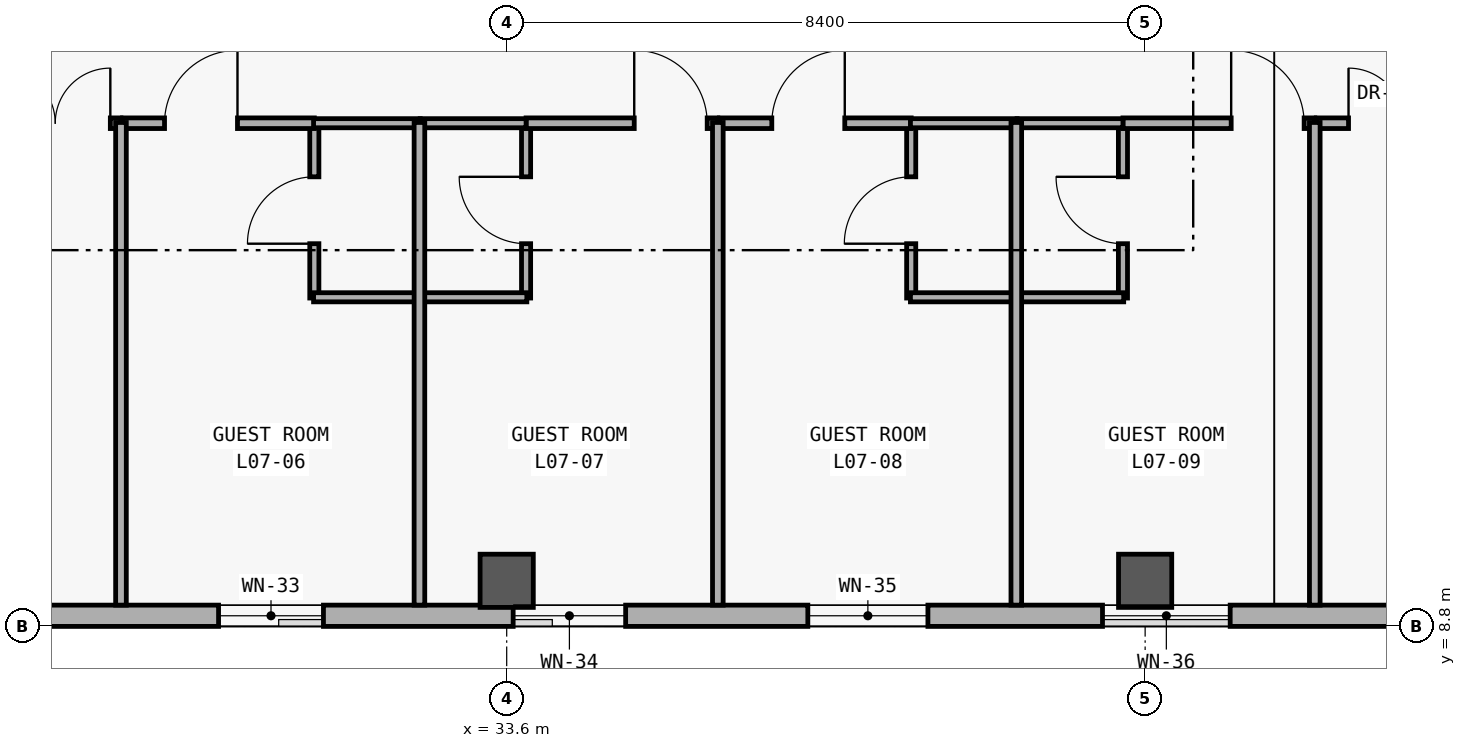
"""IFC4 building model, lengths in metres.
Left out: names, types, materials, properties, quantities, classifications, styles, units other than length and angle.
Written with IfcOpenShell. Run it as: python <this file> out.ifc"""

import sys

from ifc_helpers import new_model, si_unit, direction, frame, frame_2d, origin, origin_2d, place, context, subcontext, project, spatial, rectangle, extrude, element, fill, save


model = new_model("IFC4")
c1 = context("Model", 3, precision=1e-05, world=origin(), true_north=direction((0.0, 1.0)))
c2 = subcontext(c1, "Body", "Model", "MODEL_VIEW")
j1 = project(units=[si_unit("LENGTHUNIT", "METRE"), si_unit("PLANEANGLEUNIT", "RADIAN")], contexts=[c1])
p1 = place(None, origin())
s1 = spatial("IfcSite", under=j1, at=p1, CompositionType="ELEMENT")
p2 = place(p1, origin())
s2 = spatial("IfcBuilding", under=s1, at=p2, CompositionType="ELEMENT")
p3 = place(p2, frame((0.0, 0.0, 30.0)))
s3 = spatial("IfcBuildingStorey", under=s2, at=p3, CompositionType="ELEMENT", Elevation=30.0)
for number, where, z_axis, x_axis in (
    (1, (33.6, 9.4, 0.0), (0.0, 0.0, 1.0), (1.0, 0.0, 0.0)),
    (2, (42.0, 9.4, 0.0), (0.0, 0.0, 1.0), (1.0, 0.0, 0.0)),
):
    element("IfcColumn", number, at=place(p3, frame(where, z_axis=z_axis, x_axis=x_axis)), inside=s3, PredefinedType="COLUMN", context=c2, shape_type="SweptSolid", body=[
        extrude(rectangle(XDim=0.7, YDim=0.7, at=origin_2d()), origin(), (0.0, 0.0, 1.0), 3.6),
    ])
p4 = place(p3, frame((75.32, 8.94, 0.0), z_axis=(0.0, 0.0, 1.0), x_axis=(-1.0, 0.0, 0.0)))
e3 = element("IfcWall", 3, at=p4, inside=s3, PredefinedType="SOLIDWALL", context=c2, shape_type="SweptSolid", body=[
    extrude(rectangle(XDim=66.64, YDim=0.28, at=frame_2d((33.32, 0.0))), origin(), (0.0, 0.0, 1.0), 3.34),
])
p5 = place(p4, frame((6.47, 0.0, 0.85)))
e4 = element("IfcOpeningElement", 4, at=p5, cuts=e3, PredefinedType="OPENING", context=c2, shape_type="SweptSolid", body=[
    extrude(rectangle(XDim=2.4, YDim=1.8, at=frame_2d((1.2, 0.9))), frame((0.0, 0.15, 0.0), z_axis=(0.0, -1.0, 0.0), x_axis=(1.0, 0.0, 0.0)), (0.0, 0.0, 1.0), 0.3),
])
p6 = place(p4, frame((63.606, 0.0, 0.85)))
e5 = element("IfcOpeningElement", 5, at=p6, cuts=e3, PredefinedType="OPENING", context=c2, shape_type="SweptSolid", body=[
    extrude(rectangle(XDim=1.7, YDim=2.0, at=frame_2d((0.85, 1.0))), frame((0.0, 0.15, 0.0), z_axis=(0.0, -1.0, 0.0), x_axis=(1.0, 0.0, 0.0)), (0.0, 0.0, 1.0), 0.3),
])
p7 = place(p4, frame((59.379, 0.0, 0.85)))
e6 = element("IfcOpeningElement", 6, at=p7, cuts=e3, PredefinedType="OPENING", context=c2, shape_type="SweptSolid", body=[
    extrude(rectangle(XDim=2.3, YDim=2.05, at=frame_2d((1.15, 1.025))), frame((0.0, 0.15, 0.0), z_axis=(0.0, -1.0, 0.0), x_axis=(1.0, 0.0, 0.0)), (0.0, 0.0, 1.0), 0.3),
])
p8 = place(p4, frame((55.227, 0.0, 0.85)))
e7 = element("IfcOpeningElement", 7, at=p8, cuts=e3, PredefinedType="OPENING", context=c2, shape_type="SweptSolid", body=[
    extrude(rectangle(XDim=2.75, YDim=2.1, at=frame_2d((1.375, 1.05))), frame((0.0, 0.15, 0.0), z_axis=(0.0, -1.0, 0.0), x_axis=(1.0, 0.0, 0.0)), (0.0, 0.0, 1.0), 0.3),
])
p9 = place(p4, frame((52.085, 0.0, 0.85)))
e8 = element("IfcOpeningElement", 8, at=p9, cuts=e3, PredefinedType="OPENING", context=c2, shape_type="SweptSolid", body=[
    extrude(rectangle(XDim=1.18, YDim=1.5, at=frame_2d((0.59, 0.75))), frame((0.0, 0.15, 0.0), z_axis=(0.0, -1.0, 0.0), x_axis=(1.0, 0.0, 0.0)), (0.0, 0.0, 1.0), 0.3),
])
p10 = place(p4, frame((48.108, 0.0, 0.85)))
e9 = element("IfcOpeningElement", 9, at=p10, cuts=e3, PredefinedType="OPENING", context=c2, shape_type="SweptSolid", body=[
    extrude(rectangle(XDim=1.28, YDim=1.6, at=frame_2d((0.64, 0.8))), frame((0.0, 0.15, 0.0), z_axis=(0.0, -1.0, 0.0), x_axis=(1.0, 0.0, 0.0)), (0.0, 0.0, 1.0), 0.3),
])
p11 = place(p4, frame((44.131, 0.0, 0.85)))
e10 = element("IfcOpeningElement", 10, at=p11, cuts=e3, PredefinedType="OPENING", context=c2, shape_type="SweptSolid", body=[
    extrude(rectangle(XDim=1.38, YDim=1.7, at=frame_2d((0.69, 0.85))), frame((0.0, 0.15, 0.0), z_axis=(0.0, -1.0, 0.0), x_axis=(1.0, 0.0, 0.0)), (0.0, 0.0, 1.0), 0.3),
])
p12 = place(p4, frame((40.155, 0.0, 0.85)))
e11 = element("IfcOpeningElement", 11, at=p12, cuts=e3, PredefinedType="OPENING", context=c2, shape_type="SweptSolid", body=[
    extrude(rectangle(XDim=1.48, YDim=1.8, at=frame_2d((0.74, 0.9))), frame((0.0, 0.15, 0.0), z_axis=(0.0, -1.0, 0.0), x_axis=(1.0, 0.0, 0.0)), (0.0, 0.0, 1.0), 0.3),
])
p13 = place(p4, frame((36.178, 0.0, 0.85)))
e12 = element("IfcOpeningElement", 12, at=p13, cuts=e3, PredefinedType="OPENING", context=c2, shape_type="SweptSolid", body=[
    extrude(rectangle(XDim=1.58, YDim=1.85, at=frame_2d((0.79, 0.925))), frame((0.0, 0.15, 0.0), z_axis=(0.0, -1.0, 0.0), x_axis=(1.0, 0.0, 0.0)), (0.0, 0.0, 1.0), 0.3),
])
p14 = place(p4, frame((32.201, 0.0, 0.85)))
e13 = element("IfcOpeningElement", 13, at=p14, cuts=e3, PredefinedType="OPENING", context=c2, shape_type="SweptSolid", body=[
    extrude(rectangle(XDim=1.68, YDim=1.9, at=frame_2d((0.84, 0.95))), frame((0.0, 0.15, 0.0), z_axis=(0.0, -1.0, 0.0), x_axis=(1.0, 0.0, 0.0)), (0.0, 0.0, 1.0), 0.3),
])
p15 = place(p4, frame((28.224, 0.0, 0.85)))
e14 = element("IfcOpeningElement", 14, at=p15, cuts=e3, PredefinedType="OPENING", context=c2, shape_type="SweptSolid", body=[
    extrude(rectangle(XDim=1.78, YDim=1.95, at=frame_2d((0.89, 0.975))), frame((0.0, 0.15, 0.0), z_axis=(0.0, -1.0, 0.0), x_axis=(1.0, 0.0, 0.0)), (0.0, 0.0, 1.0), 0.3),
])
p16 = place(p4, frame((24.247, 0.0, 0.85)))
e15 = element("IfcOpeningElement", 15, at=p16, cuts=e3, PredefinedType="OPENING", context=c2, shape_type="SweptSolid", body=[
    extrude(rectangle(XDim=1.88, YDim=1.95, at=frame_2d((0.94, 0.975))), frame((0.0, 0.15, 0.0), z_axis=(0.0, -1.0, 0.0), x_axis=(1.0, 0.0, 0.0)), (0.0, 0.0, 1.0), 0.3),
])
p17 = place(p4, frame((20.235, 0.0, 0.85)))
e16 = element("IfcOpeningElement", 16, at=p17, cuts=e3, PredefinedType="OPENING", context=c2, shape_type="SweptSolid", body=[
    extrude(rectangle(XDim=2.05, YDim=1.95, at=frame_2d((1.025, 0.975))), frame((0.0, 0.15, 0.0), z_axis=(0.0, -1.0, 0.0), x_axis=(1.0, 0.0, 0.0)), (0.0, 0.0, 1.0), 0.3),
])
p18 = place(p4, frame((16.243, 0.0, 0.85)))
e17 = element("IfcOpeningElement", 17, at=p18, cuts=e3, PredefinedType="OPENING", context=c2, shape_type="SweptSolid", body=[
    extrude(rectangle(XDim=2.18, YDim=1.95, at=frame_2d((1.09, 0.975))), frame((0.0, 0.15, 0.0), z_axis=(0.0, -1.0, 0.0), x_axis=(1.0, 0.0, 0.0)), (0.0, 0.0, 1.0), 0.3),
])
p19 = place(p3, frame((31.069, 13.12, 0.0), z_axis=(0.0, 0.0, 1.0), x_axis=(0.0, 1.0, 0.0)))
e18 = element("IfcWall", 18, at=p19, inside=s3, PredefinedType="PARTITIONING", context=c2, shape_type="SweptSolid", body=[
    extrude(rectangle(XDim=2.31, YDim=0.12, at=frame_2d((1.155, 0.0))), origin(), (0.0, 0.0, 1.0), 2.48),
])
p20 = place(p19, frame((0.715, 0.0, 0.0)))
e19 = element("IfcOpeningElement", 19, at=p20, cuts=e18, PredefinedType="OPENING", context=c2, shape_type="SweptSolid", body=[
    extrude(rectangle(XDim=0.88, YDim=2.15, at=frame_2d((0.44, 1.075))), frame((0.0, 0.07, 0.0), z_axis=(0.0, -1.0, 0.0), x_axis=(1.0, 0.0, 0.0)), (0.0, 0.0, 1.0), 0.14),
])
p21 = place(p3, frame((33.855, 13.12, 0.0), z_axis=(0.0, 0.0, 1.0), x_axis=(0.0, 1.0, 0.0)))
e20 = element("IfcWall", 20, at=p21, inside=s3, PredefinedType="PARTITIONING", context=c2, shape_type="SweptSolid", body=[
    extrude(rectangle(XDim=2.31, YDim=0.12, at=frame_2d((1.155, 0.0))), origin(), (0.0, 0.0, 1.0), 2.48),
])
p22 = place(p21, frame((0.715, 0.0, 0.0)))
e21 = element("IfcOpeningElement", 21, at=p22, cuts=e20, PredefinedType="OPENING", context=c2, shape_type="SweptSolid", body=[
    extrude(rectangle(XDim=0.88, YDim=2.15, at=frame_2d((0.44, 1.075))), frame((0.0, 0.07, 0.0), z_axis=(0.0, -1.0, 0.0), x_axis=(1.0, 0.0, 0.0)), (0.0, 0.0, 1.0), 0.14),
])
p23 = place(p3, frame((38.922, 13.12, 0.0), z_axis=(0.0, 0.0, 1.0), x_axis=(0.0, 1.0, 0.0)))
e22 = element("IfcWall", 22, at=p23, inside=s3, PredefinedType="PARTITIONING", context=c2, shape_type="SweptSolid", body=[
    extrude(rectangle(XDim=2.31, YDim=0.12, at=frame_2d((1.155, 0.0))), origin(), (0.0, 0.0, 1.0), 2.48),
])
p24 = place(p23, frame((0.715, 0.0, 0.0)))
e23 = element("IfcOpeningElement", 23, at=p24, cuts=e22, PredefinedType="OPENING", context=c2, shape_type="SweptSolid", body=[
    extrude(rectangle(XDim=0.88, YDim=2.15, at=frame_2d((0.44, 1.075))), frame((0.0, 0.07, 0.0), z_axis=(0.0, -1.0, 0.0), x_axis=(1.0, 0.0, 0.0)), (0.0, 0.0, 1.0), 0.14),
])
p25 = place(p3, frame((41.708, 13.12, 0.0), z_axis=(0.0, 0.0, 1.0), x_axis=(0.0, 1.0, 0.0)))
e24 = element("IfcWall", 24, at=p25, inside=s3, PredefinedType="PARTITIONING", context=c2, shape_type="SweptSolid", body=[
    extrude(rectangle(XDim=2.31, YDim=0.12, at=frame_2d((1.155, 0.0))), origin(), (0.0, 0.0, 1.0), 2.48),
])
p26 = place(p25, frame((0.715, 0.0, 0.0)))
e25 = element("IfcOpeningElement", 25, at=p26, cuts=e24, PredefinedType="OPENING", context=c2, shape_type="SweptSolid", body=[
    extrude(rectangle(XDim=0.88, YDim=2.15, at=frame_2d((0.44, 1.075))), frame((0.0, 0.07, 0.0), z_axis=(0.0, -1.0, 0.0), x_axis=(1.0, 0.0, 0.0)), (0.0, 0.0, 1.0), 0.14),
])
p27 = place(p3, frame((26.001, 15.42, 0.0), z_axis=(0.0, 0.0, 1.0), x_axis=(1.0, 0.0, 0.0)))
e26 = element("IfcWall", 26, at=p27, inside=s3, PredefinedType="PARTITIONING", context=c2, shape_type="SweptSolid", body=[
    extrude(rectangle(XDim=2.524, YDim=0.14, at=frame_2d((1.262, 0.0))), origin(), (0.0, 0.0, 1.0), 2.48),
])
p28 = place(p27, frame((0.934, 0.0, 0.0)))
e27 = element("IfcOpeningElement", 27, at=p28, cuts=e26, PredefinedType="OPENING", context=c2, shape_type="SweptSolid", body=[
    extrude(rectangle(XDim=1.45, YDim=2.3, at=frame_2d((0.725, 1.15))), frame((0.0, 0.08, 0.0), z_axis=(0.0, -1.0, 0.0), x_axis=(1.0, 0.0, 0.0)), (0.0, 0.0, 1.0), 0.16),
])
p29 = place(p3, frame((28.545, 15.42, 0.0), z_axis=(0.0, 0.0, 1.0), x_axis=(1.0, 0.0, 0.0)))
e28 = element("IfcWall", 28, at=p29, inside=s3, PredefinedType="PARTITIONING", context=c2, shape_type="SweptSolid", body=[
    extrude(rectangle(XDim=2.524, YDim=0.14, at=frame_2d((1.262, 0.0))), origin(), (0.0, 0.0, 1.0), 2.48),
])
p30 = place(p29, frame((0.553, 0.0, 0.0)))
e29 = element("IfcOpeningElement", 29, at=p30, cuts=e28, PredefinedType="OPENING", context=c2, shape_type="SweptSolid", body=[
    extrude(rectangle(XDim=0.96, YDim=2.25, at=frame_2d((0.48, 1.125))), frame((0.0, 0.08, 0.0), z_axis=(0.0, -1.0, 0.0), x_axis=(1.0, 0.0, 0.0)), (0.0, 0.0, 1.0), 0.16),
])
p31 = place(p3, frame((33.855, 15.42, 0.0), z_axis=(0.0, 0.0, 1.0), x_axis=(1.0, 0.0, 0.0)))
e30 = element("IfcWall", 30, at=p31, inside=s3, PredefinedType="PARTITIONING", context=c2, shape_type="SweptSolid", body=[
    extrude(rectangle(XDim=2.523, YDim=0.14, at=frame_2d((1.261, 0.0))), origin(), (0.0, 0.0, 1.0), 2.48),
])
p32 = place(p31, frame((1.423, 0.0, 0.0)))
e31 = element("IfcOpeningElement", 31, at=p32, cuts=e30, PredefinedType="OPENING", context=c2, shape_type="SweptSolid", body=[
    extrude(rectangle(XDim=0.96, YDim=2.25, at=frame_2d((0.48, 1.125))), frame((0.0, 0.08, 0.0), z_axis=(0.0, -1.0, 0.0), x_axis=(1.0, 0.0, 0.0)), (0.0, 0.0, 1.0), 0.16),
])
p33 = place(p3, frame((36.398, 15.42, 0.0), z_axis=(0.0, 0.0, 1.0), x_axis=(1.0, 0.0, 0.0)))
e32 = element("IfcWall", 32, at=p33, inside=s3, PredefinedType="PARTITIONING", context=c2, shape_type="SweptSolid", body=[
    extrude(rectangle(XDim=2.524, YDim=0.14, at=frame_2d((1.262, 0.0))), origin(), (0.0, 0.0, 1.0), 2.48),
])
p34 = place(p33, frame((0.69, 0.0, 0.0)))
e33 = element("IfcOpeningElement", 33, at=p34, cuts=e32, PredefinedType="OPENING", context=c2, shape_type="SweptSolid", body=[
    extrude(rectangle(XDim=0.96, YDim=2.25, at=frame_2d((0.48, 1.125))), frame((0.0, 0.08, 0.0), z_axis=(0.0, -1.0, 0.0), x_axis=(1.0, 0.0, 0.0)), (0.0, 0.0, 1.0), 0.16),
])
p35 = place(p3, frame((41.708, 15.42, 0.0), z_axis=(0.0, 0.0, 1.0), x_axis=(1.0, 0.0, 0.0)))
e34 = element("IfcWall", 34, at=p35, inside=s3, PredefinedType="PARTITIONING", context=c2, shape_type="SweptSolid", body=[
    extrude(rectangle(XDim=2.524, YDim=0.14, at=frame_2d((1.262, 0.0))), origin(), (0.0, 0.0, 1.0), 2.48),
])
p36 = place(p35, frame((1.424, 0.0, 0.0)))
e35 = element("IfcOpeningElement", 35, at=p36, cuts=e34, PredefinedType="OPENING", context=c2, shape_type="SweptSolid", body=[
    extrude(rectangle(XDim=0.96, YDim=2.25, at=frame_2d((0.48, 1.125))), frame((0.0, 0.08, 0.0), z_axis=(0.0, -1.0, 0.0), x_axis=(1.0, 0.0, 0.0)), (0.0, 0.0, 1.0), 0.16),
])
p37 = place(p3, frame((44.252, 15.42, 0.0), z_axis=(0.0, 0.0, 1.0), x_axis=(1.0, 0.0, 0.0)))
e36 = element("IfcWall", 36, at=p37, inside=s3, PredefinedType="PARTITIONING", context=c2, shape_type="SweptSolid", body=[
    extrude(rectangle(XDim=2.524, YDim=0.14, at=frame_2d((1.262, 0.0))), origin(), (0.0, 0.0, 1.0), 2.48),
])
p38 = place(p37, frame((0.424, 0.0, 0.0)))
e37 = element("IfcOpeningElement", 37, at=p38, cuts=e36, PredefinedType="OPENING", context=c2, shape_type="SweptSolid", body=[
    extrude(rectangle(XDim=1.45, YDim=2.3, at=frame_2d((0.725, 1.15))), frame((0.0, 0.08, 0.0), z_axis=(0.0, -1.0, 0.0), x_axis=(1.0, 0.0, 0.0)), (0.0, 0.0, 1.0), 0.16),
])
for number, where, z_axis, x_axis in (
    (38, (31.059, 13.13, 0.0), (0.0, 0.0, 1.0), (1.0, 0.0, 0.0)),
    (39, (31.059, 15.42, 0.0), (0.0, 0.0, 1.0), (1.0, 0.0, 0.0)),
):
    element("IfcWall", number, at=place(p3, frame(where, z_axis=z_axis, x_axis=x_axis)), inside=s3, PredefinedType="PARTITIONING", context=c2, shape_type="SweptSolid", body=[
        extrude(rectangle(XDim=1.403, YDim=0.12, at=frame_2d((0.701, 0.0))), origin(), (0.0, 0.0, 1.0), 2.48),
    ])
p39 = place(p3, frame((32.462, 13.13, 0.0), z_axis=(0.0, 0.0, 1.0), x_axis=(1.0, 0.0, 0.0)))
e40 = element("IfcWall", 40, at=p39, inside=s3, PredefinedType="PARTITIONING", context=c2, shape_type="SweptSolid", body=[
    extrude(rectangle(XDim=1.403, YDim=0.12, at=frame_2d((0.702, 0.0))), origin(), (0.0, 0.0, 1.0), 2.48),
])
p40 = place(p3, frame((32.462, 15.42, 0.0), z_axis=(0.0, 0.0, 1.0), x_axis=(1.0, 0.0, 0.0)))
e41 = element("IfcWall", 41, at=p40, inside=s3, PredefinedType="PARTITIONING", context=c2, shape_type="SweptSolid", body=[
    extrude(rectangle(XDim=1.393, YDim=0.12, at=frame_2d((0.697, 0.0))), origin(), (0.0, 0.0, 1.0), 2.48),
])
for number, where, z_axis, x_axis in (
    (42, (38.912, 13.13, 0.0), (0.0, 0.0, 1.0), (1.0, 0.0, 0.0)),
    (43, (38.912, 15.42, 0.0), (0.0, 0.0, 1.0), (1.0, 0.0, 0.0)),
):
    element("IfcWall", number, at=place(p3, frame(where, z_axis=z_axis, x_axis=x_axis)), inside=s3, PredefinedType="PARTITIONING", context=c2, shape_type="SweptSolid", body=[
        extrude(rectangle(XDim=1.403, YDim=0.12, at=frame_2d((0.701, 0.0))), origin(), (0.0, 0.0, 1.0), 2.48),
    ])
p41 = place(p3, frame((40.315, 13.13, 0.0), z_axis=(0.0, 0.0, 1.0), x_axis=(1.0, 0.0, 0.0)))
e44 = element("IfcWall", 44, at=p41, inside=s3, PredefinedType="PARTITIONING", context=c2, shape_type="SweptSolid", body=[
    extrude(rectangle(XDim=1.403, YDim=0.12, at=frame_2d((0.702, 0.0))), origin(), (0.0, 0.0, 1.0), 2.48),
])
p42 = place(p3, frame((40.315, 15.42, 0.0), z_axis=(0.0, 0.0, 1.0), x_axis=(1.0, 0.0, 0.0)))
e45 = element("IfcWall", 45, at=p42, inside=s3, PredefinedType="PARTITIONING", context=c2, shape_type="SweptSolid", body=[
    extrude(rectangle(XDim=1.393, YDim=0.12, at=frame_2d((0.697, 0.0))), origin(), (0.0, 0.0, 1.0), 2.48),
])
for number, where, z_axis, x_axis in (
    (46, (28.525, 9.08, 0.0), (0.0, 0.0, 1.0), (0.0, 1.0, 0.0)),
    (47, (32.452, 9.08, 0.0), (0.0, 0.0, 1.0), (0.0, 1.0, 0.0)),
    (48, (36.378, 9.08, 0.0), (0.0, 0.0, 1.0), (0.0, 1.0, 0.0)),
    (49, (40.305, 9.08, 0.0), (0.0, 0.0, 1.0), (0.0, 1.0, 0.0)),
    (50, (44.232, 9.08, 0.0), (0.0, 0.0, 1.0), (0.0, 1.0, 0.0)),
):
    element("IfcWall", number, at=place(p3, frame(where, z_axis=z_axis, x_axis=x_axis)), inside=s3, PredefinedType="PARTITIONING", context=c2, shape_type="SweptSolid", body=[
        extrude(rectangle(XDim=6.35, YDim=0.14, at=frame_2d((3.175, 0.0))), origin(), (0.0, 0.0, 1.0), 2.48),
    ])
p43 = place(p11, origin())
e51 = element("IfcWindow", 51, at=p43, inside=s3, PartitioningType="SINGLE_PANEL", PredefinedType="WINDOW", context=c2, shape_type="SweptSolid", body=[
    extrude(rectangle(XDim=1.38, YDim=1.7, at=frame_2d((0.69, 0.85))), frame((0.0, 0.03, 0.0), z_axis=(0.0, -1.0, 0.0), x_axis=(1.0, 0.0, 0.0)), (0.0, 0.0, 1.0), 0.06),
])
fill(e10, e51)
p44 = place(p12, origin())
e52 = element("IfcWindow", 52, at=p44, inside=s3, PartitioningType="SINGLE_PANEL", PredefinedType="WINDOW", context=c2, shape_type="SweptSolid", body=[
    extrude(rectangle(XDim=1.48, YDim=1.8, at=frame_2d((0.74, 0.9))), frame((0.0, 0.03, 0.0), z_axis=(0.0, -1.0, 0.0), x_axis=(1.0, 0.0, 0.0)), (0.0, 0.0, 1.0), 0.06),
])
fill(e11, e52)
p45 = place(p13, origin())
e53 = element("IfcWindow", 53, at=p45, inside=s3, PartitioningType="SINGLE_PANEL", PredefinedType="WINDOW", context=c2, shape_type="SweptSolid", body=[
    extrude(rectangle(XDim=1.58, YDim=1.85, at=frame_2d((0.79, 0.925))), frame((0.0, 0.03, 0.0), z_axis=(0.0, -1.0, 0.0), x_axis=(1.0, 0.0, 0.0)), (0.0, 0.0, 1.0), 0.06),
])
fill(e12, e53)
p46 = place(p14, origin())
e54 = element("IfcWindow", 54, at=p46, inside=s3, PartitioningType="SINGLE_PANEL", PredefinedType="WINDOW", context=c2, shape_type="SweptSolid", body=[
    extrude(rectangle(XDim=1.68, YDim=1.9, at=frame_2d((0.84, 0.95))), frame((0.0, 0.03, 0.0), z_axis=(0.0, -1.0, 0.0), x_axis=(1.0, 0.0, 0.0)), (0.0, 0.0, 1.0), 0.06),
])
fill(e13, e54)
p47 = place(p20, origin())
e55 = element("IfcDoor", 55, at=p47, inside=s3, OperationType="SINGLE_SWING_LEFT", PredefinedType="DOOR", context=c2, shape_type="SweptSolid", body=[
    extrude(rectangle(XDim=0.88, YDim=2.15, at=frame_2d((0.44, 1.075))), frame((0.0, 0.025, 0.0), z_axis=(0.0, -1.0, 0.0), x_axis=(1.0, 0.0, 0.0)), (0.0, 0.0, 1.0), 0.05),
])
fill(e19, e55)
p48 = place(p22, origin())
e56 = element("IfcDoor", 56, at=p48, inside=s3, OperationType="SINGLE_SWING_RIGHT", PredefinedType="DOOR", context=c2, shape_type="SweptSolid", body=[
    extrude(rectangle(XDim=0.88, YDim=2.15, at=frame_2d((0.44, 1.075))), frame((0.0, 0.025, 0.0), z_axis=(0.0, -1.0, 0.0), x_axis=(1.0, 0.0, 0.0)), (0.0, 0.0, 1.0), 0.05),
])
fill(e21, e56)
p49 = place(p24, origin())
e57 = element("IfcDoor", 57, at=p49, inside=s3, OperationType="SINGLE_SWING_LEFT", PredefinedType="DOOR", context=c2, shape_type="SweptSolid", body=[
    extrude(rectangle(XDim=0.88, YDim=2.15, at=frame_2d((0.44, 1.075))), frame((0.0, 0.025, 0.0), z_axis=(0.0, -1.0, 0.0), x_axis=(1.0, 0.0, 0.0)), (0.0, 0.0, 1.0), 0.05),
])
fill(e23, e57)
p50 = place(p26, origin())
e58 = element("IfcDoor", 58, at=p50, inside=s3, OperationType="SINGLE_SWING_RIGHT", PredefinedType="DOOR", context=c2, shape_type="SweptSolid", body=[
    extrude(rectangle(XDim=0.88, YDim=2.15, at=frame_2d((0.44, 1.075))), frame((0.0, 0.025, 0.0), z_axis=(0.0, -1.0, 0.0), x_axis=(1.0, 0.0, 0.0)), (0.0, 0.0, 1.0), 0.05),
])
fill(e25, e58)
p51 = place(p28, origin())
e59 = element("IfcDoor", 59, at=p51, inside=s3, OperationType="DOUBLE_DOOR_SINGLE_SWING", PredefinedType="DOOR", context=c2, shape_type="SweptSolid", body=[
    extrude(rectangle(XDim=1.45, YDim=2.3, at=frame_2d((0.725, 1.15))), frame((0.0, 0.025, 0.0), z_axis=(0.0, -1.0, 0.0), x_axis=(1.0, 0.0, 0.0)), (0.0, 0.0, 1.0), 0.05),
])
fill(e27, e59)
p52 = place(p30, origin())
e60 = element("IfcDoor", 60, at=p52, inside=s3, OperationType="SINGLE_SWING_RIGHT", PredefinedType="DOOR", context=c2, shape_type="SweptSolid", body=[
    extrude(rectangle(XDim=0.96, YDim=2.25, at=frame_2d((0.48, 1.125))), frame((0.0, 0.025, 0.0), z_axis=(0.0, -1.0, 0.0), x_axis=(1.0, 0.0, 0.0)), (0.0, 0.0, 1.0), 0.05),
])
fill(e29, e60)
p53 = place(p32, origin())
e61 = element("IfcDoor", 61, at=p53, inside=s3, OperationType="SINGLE_SWING_LEFT", PredefinedType="DOOR", context=c2, shape_type="SweptSolid", body=[
    extrude(rectangle(XDim=0.96, YDim=2.25, at=frame_2d((0.48, 1.125))), frame((0.0, 0.025, 0.0), z_axis=(0.0, -1.0, 0.0), x_axis=(1.0, 0.0, 0.0)), (0.0, 0.0, 1.0), 0.05),
])
fill(e31, e61)
p54 = place(p34, origin())
e62 = element("IfcDoor", 62, at=p54, inside=s3, OperationType="SINGLE_SWING_RIGHT", PredefinedType="DOOR", context=c2, shape_type="SweptSolid", body=[
    extrude(rectangle(XDim=0.96, YDim=2.25, at=frame_2d((0.48, 1.125))), frame((0.0, 0.025, 0.0), z_axis=(0.0, -1.0, 0.0), x_axis=(1.0, 0.0, 0.0)), (0.0, 0.0, 1.0), 0.05),
])
fill(e33, e62)
p55 = place(p36, origin())
e63 = element("IfcDoor", 63, at=p55, inside=s3, OperationType="SINGLE_SWING_LEFT", PredefinedType="DOOR", context=c2, shape_type="SweptSolid", body=[
    extrude(rectangle(XDim=0.96, YDim=2.25, at=frame_2d((0.48, 1.125))), frame((0.0, 0.025, 0.0), z_axis=(0.0, -1.0, 0.0), x_axis=(1.0, 0.0, 0.0)), (0.0, 0.0, 1.0), 0.05),
])
fill(e35, e63)
p56 = place(p38, origin())
e64 = element("IfcDoor", 64, at=p56, inside=s3, OperationType="DOUBLE_DOOR_SINGLE_SWING", PredefinedType="DOOR", context=c2, shape_type="SweptSolid", body=[
    extrude(rectangle(XDim=1.45, YDim=2.3, at=frame_2d((0.725, 1.15))), frame((0.0, 0.025, 0.0), z_axis=(0.0, -1.0, 0.0), x_axis=(1.0, 0.0, 0.0)), (0.0, 0.0, 1.0), 0.05),
])
fill(e37, e64)
save(model, sys.argv[1])
